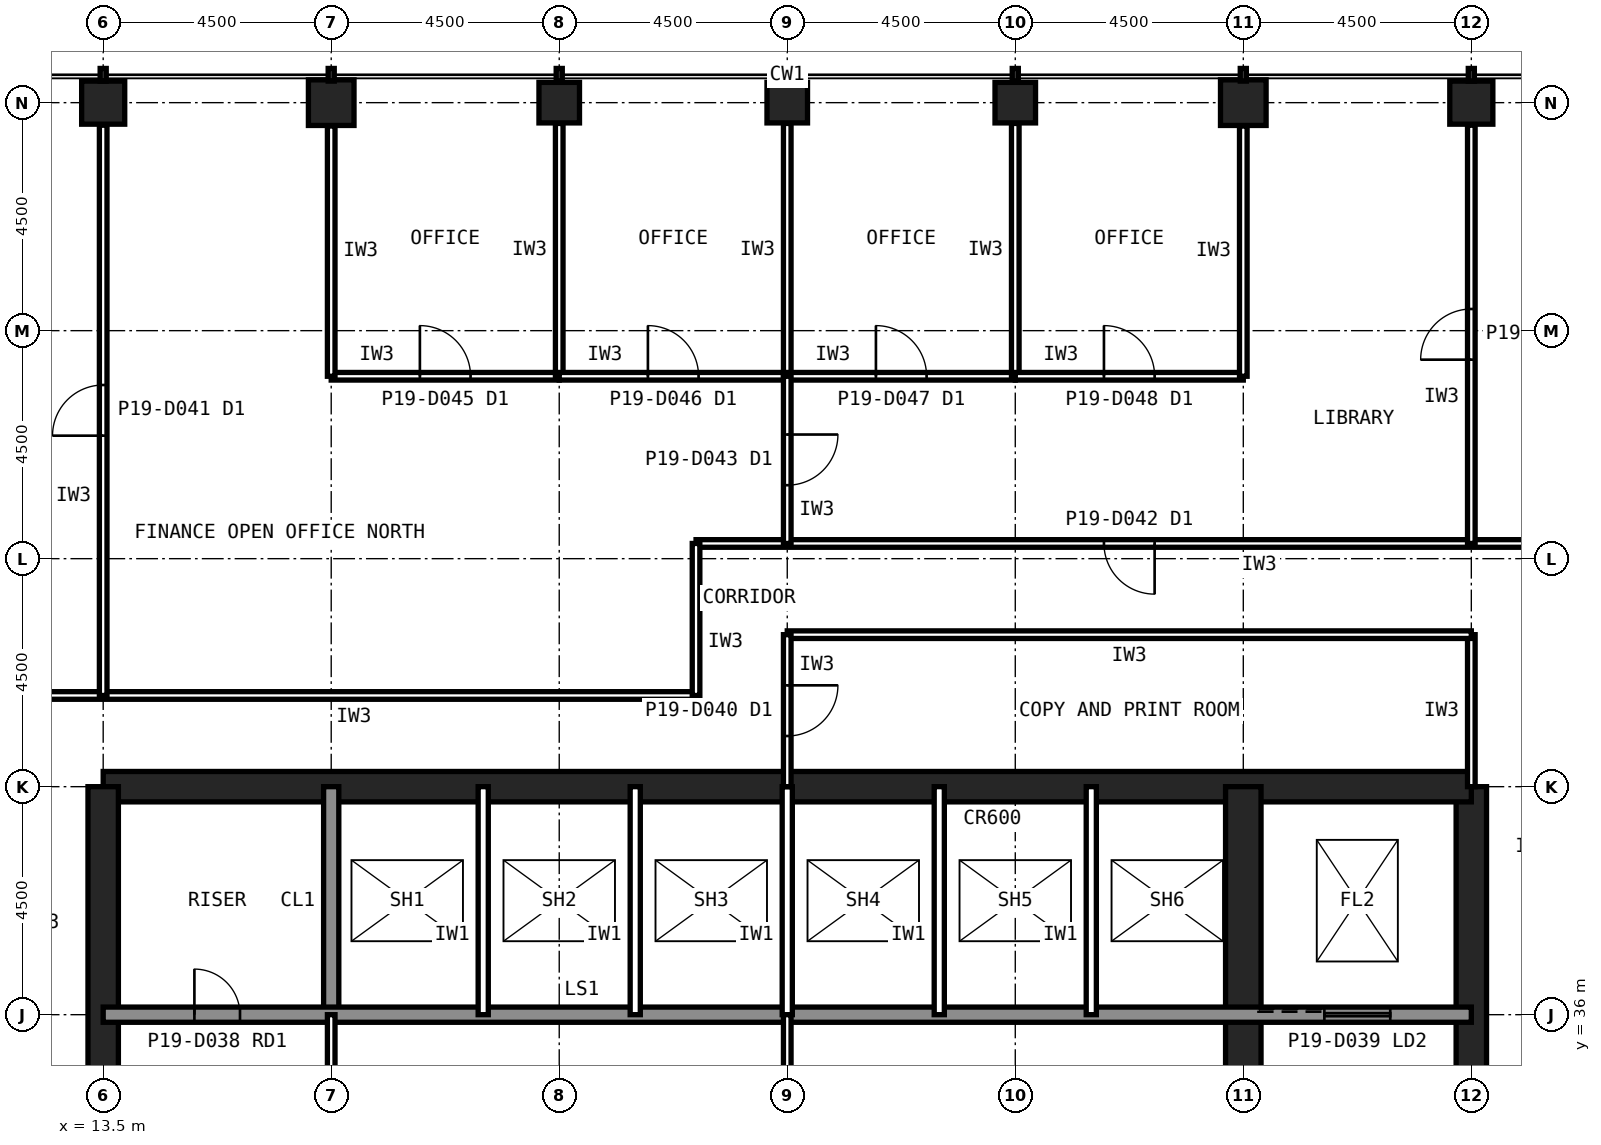
"""IFC4 building model, lengths in metres.
Left out: names, types, materials, properties, quantities, classifications, styles, units other than length and angle.
Written with IfcOpenShell. Run it as: python <this file> out.ifc"""

import sys

from ifc_helpers import new_model, si_unit, direction, frame, frame_2d, origin, origin_2d, place, context, subcontext, project, spatial, rectangle, hollow_rectangle, extrude, element, fill, save


model = new_model("IFC4")
c1 = context("Model", 3, precision=1e-05, world=origin(), true_north=direction((0.0, 1.0)))
c2 = subcontext(c1, "Body", "Model", "MODEL_VIEW")
j1 = project(units=[si_unit("LENGTHUNIT", "METRE"), si_unit("PLANEANGLEUNIT", "RADIAN")], contexts=[c1])
p1 = place(None, origin())
s1 = spatial("IfcSite", under=j1, at=p1, CompositionType="ELEMENT")
p2 = place(p1, origin())
s2 = spatial("IfcBuilding", under=s1, at=p2, CompositionType="ELEMENT")
p3 = place(p2, frame((0.0, 0.0, 79.4)))
s3 = spatial("IfcBuildingStorey", under=s2, at=p3, CompositionType="ELEMENT", Elevation=79.4)
p4 = place(p3, frame((40.5, 54.0, 0.0), z_axis=(0.0, 0.0, 1.0), x_axis=(1.0, 0.0, 0.0)))
e1 = element("IfcColumn", 1, at=p4, inside=s3, PredefinedType="COLUMN", context=c2, shape_type="SweptSolid", body=[
    extrude(hollow_rectangle(XDim=0.85, YDim=0.85, WallThickness=0.05, at=origin_2d()), origin(), (0.0, 0.0, 1.0), 4.2),
])
p5 = place(p3, frame((36.0, 54.0, 0.0), z_axis=(0.0, 0.0, 1.0), x_axis=(1.0, 0.0, 0.0)))
e2 = element("IfcColumn", 2, at=p5, inside=s3, PredefinedType="COLUMN", context=c2, shape_type="SweptSolid", body=[
    extrude(hollow_rectangle(XDim=0.9, YDim=0.9, WallThickness=0.063, at=origin_2d()), origin(), (0.0, 0.0, 1.0), 4.2),
])
for number, where, z_axis, x_axis in (
    (3, (31.5, 54.0, 0.0), (0.0, 0.0, 1.0), (1.0, 0.0, 0.0)),
    (4, (27.0, 54.0, 0.0), (0.0, 0.0, 1.0), (1.0, 0.0, 0.0)),
    (5, (22.5, 54.0, 0.0), (0.0, 0.0, 1.0), (1.0, 0.0, 0.0)),
):
    element("IfcColumn", number, at=place(p3, frame(where, z_axis=z_axis, x_axis=x_axis)), inside=s3, PredefinedType="COLUMN", context=c2, shape_type="SweptSolid", body=[
        extrude(hollow_rectangle(XDim=0.8, YDim=0.8, WallThickness=0.045, at=origin_2d()), origin(), (0.0, 0.0, 1.0), 4.2),
    ])
p6 = place(p3, frame((18.0, 54.0, 0.0), z_axis=(0.0, 0.0, 1.0), x_axis=(1.0, 0.0, 0.0)))
e6 = element("IfcColumn", 6, at=p6, inside=s3, PredefinedType="COLUMN", context=c2, shape_type="SweptSolid", body=[
    extrude(hollow_rectangle(XDim=0.9, YDim=0.9, WallThickness=0.063, at=origin_2d()), origin(), (0.0, 0.0, 1.0), 4.2),
])
p7 = place(p3, frame((13.5, 54.0, 0.0), z_axis=(0.0, 0.0, 1.0), x_axis=(1.0, 0.0, 0.0)))
e7 = element("IfcColumn", 7, at=p7, inside=s3, PredefinedType="COLUMN", context=c2, shape_type="SweptSolid", body=[
    extrude(hollow_rectangle(XDim=0.85, YDim=0.85, WallThickness=0.05, at=origin_2d()), origin(), (0.0, 0.0, 1.0), 4.2),
])
p8 = place(p3, frame((40.5, 13.5, 0.0), z_axis=(0.0, 0.0, 1.0), x_axis=(0.0, 1.0, 0.0)))
e8 = element("IfcWall", 8, at=p8, inside=s3, PredefinedType="SHEAR", context=c2, shape_type="SweptSolid", body=[
    extrude(rectangle(XDim=27.0, YDim=0.6, at=frame_2d((13.5, 0.0))), origin(), (0.0, 0.0, 1.0), 4.2),
])
p9 = place(p8, frame((5.85, 0.0, 0.0)))
e9 = element("IfcOpeningElement", 9, at=p9, cuts=e8, PredefinedType="OPENING", context=c2, shape_type="SweptSolid", body=[
    extrude(rectangle(XDim=1.8, YDim=2.1, at=frame_2d((0.9, 1.05))), frame((0.0, 0.31, 0.0), z_axis=(0.0, -1.0, 0.0), x_axis=(1.0, 0.0, 0.0)), (0.0, 0.0, 1.0), 0.62),
])
p10 = place(p8, frame((19.65, 0.0, 0.0)))
e10 = element("IfcOpeningElement", 10, at=p10, cuts=e8, PredefinedType="OPENING", context=c2, shape_type="SweptSolid", body=[
    extrude(rectangle(XDim=1.2, YDim=2.1, at=frame_2d((0.6, 1.05))), frame((0.0, 0.31, 0.0), z_axis=(0.0, -1.0, 0.0), x_axis=(1.0, 0.0, 0.0)), (0.0, 0.0, 1.0), 0.62),
])
p11 = place(p3, frame((40.5, 40.5, 0.0), z_axis=(0.0, 0.0, 1.0), x_axis=(-1.0, 0.0, 0.0)))
e11 = element("IfcWall", 11, at=p11, inside=s3, PredefinedType="SHEAR", context=c2, shape_type="SweptSolid", body=[
    extrude(rectangle(XDim=27.0, YDim=0.6, at=frame_2d((13.5, 0.0))), origin(), (0.0, 0.0, 1.0), 4.2),
])
p12 = place(p3, frame((13.5, 40.5, 0.0), z_axis=(0.0, 0.0, 1.0), x_axis=(0.0, -1.0, 0.0)))
e12 = element("IfcWall", 12, at=p12, inside=s3, PredefinedType="SHEAR", context=c2, shape_type="SweptSolid", body=[
    extrude(rectangle(XDim=27.0, YDim=0.6, at=frame_2d((13.5, 0.0))), origin(), (0.0, 0.0, 1.0), 4.2),
])
p13 = place(p12, frame((19.65, 0.0, 0.0)))
e13 = element("IfcOpeningElement", 13, at=p13, cuts=e12, PredefinedType="OPENING", context=c2, shape_type="SweptSolid", body=[
    extrude(rectangle(XDim=1.2, YDim=2.1, at=frame_2d((0.6, 1.05))), frame((0.0, 0.31, 0.0), z_axis=(0.0, -1.0, 0.0), x_axis=(1.0, 0.0, 0.0)), (0.0, 0.0, 1.0), 0.62),
])
p14 = place(p12, frame((5.85, 0.0, 0.0)))
e14 = element("IfcOpeningElement", 14, at=p14, cuts=e12, PredefinedType="OPENING", context=c2, shape_type="SweptSolid", body=[
    extrude(rectangle(XDim=1.8, YDim=2.1, at=frame_2d((0.9, 1.05))), frame((0.0, 0.31, 0.0), z_axis=(0.0, -1.0, 0.0), x_axis=(1.0, 0.0, 0.0)), (0.0, 0.0, 1.0), 0.62),
])
p15 = place(p3, frame((18.0, 36.0, 0.0), z_axis=(0.0, 0.0, 1.0), x_axis=(0.0, 1.0, 0.0)))
e15 = element("IfcWall", 15, at=p15, inside=s3, PredefinedType="SOLIDWALL", context=c2, shape_type="SweptSolid", body=[
    extrude(rectangle(XDim=4.5, YDim=0.3, at=frame_2d((2.25, 0.0))), origin(), (0.0, 0.0, 1.0), 4.04),
])
p16 = place(p3, frame((36.0, 22.5, 0.0), z_axis=(0.0, 0.0, 1.0), x_axis=(0.0, 1.0, 0.0)))
e16 = element("IfcWall", 16, at=p16, inside=s3, PredefinedType="SHEAR", context=c2, shape_type="SweptSolid", body=[
    extrude(rectangle(XDim=18.0, YDim=0.7, at=frame_2d((9.0, 0.0))), origin(), (0.0, 0.0, 1.0), 4.2),
])
p17 = place(p3, frame((13.5, 36.0, 0.0), z_axis=(0.0, 0.0, 1.0), x_axis=(1.0, 0.0, 0.0)))
e17 = element("IfcWall", 17, at=p17, inside=s3, PredefinedType="SOLIDWALL", context=c2, shape_type="SweptSolid", body=[
    extrude(rectangle(XDim=27.0, YDim=0.3, at=frame_2d((13.5, 0.0))), origin(), (0.0, 0.0, 1.0), 4.04),
])
p18 = place(p17, frame((1.8, 0.0, 0.0)))
e18 = element("IfcOpeningElement", 18, at=p18, cuts=e17, PredefinedType="OPENING", context=c2, shape_type="SweptSolid", body=[
    extrude(rectangle(XDim=0.9, YDim=2.1, at=frame_2d((0.45, 1.05))), frame((0.0, 0.16, 0.0), z_axis=(0.0, -1.0, 0.0), x_axis=(1.0, 0.0, 0.0)), (0.0, 0.0, 1.0), 0.32),
])
p19 = place(p17, frame((24.1, 0.0, 0.0)))
e19 = element("IfcOpeningElement", 19, at=p19, cuts=e17, PredefinedType="OPENING", context=c2, shape_type="SweptSolid", body=[
    extrude(rectangle(XDim=1.3, YDim=2.2, at=frame_2d((0.65, 1.1))), frame((0.0, 0.16, 0.0), z_axis=(0.0, -1.0, 0.0), x_axis=(1.0, 0.0, 0.0)), (0.0, 0.0, 1.0), 0.32),
])
for number, where, z_axis, x_axis in (
    (20, (21.0, 36.0, 0.0), (0.0, 0.0, 1.0), (0.0, 1.0, 0.0)),
    (21, (24.0, 36.0, 0.0), (0.0, 0.0, 1.0), (0.0, 1.0, 0.0)),
    (22, (27.0, 36.0, 0.0), (0.0, 0.0, 1.0), (0.0, 1.0, 0.0)),
    (23, (30.0, 36.0, 0.0), (0.0, 0.0, 1.0), (0.0, 1.0, 0.0)),
    (24, (33.0, 36.0, 0.0), (0.0, 0.0, 1.0), (0.0, 1.0, 0.0)),
):
    element("IfcWall", number, at=place(p3, frame(where, z_axis=z_axis, x_axis=x_axis)), inside=s3, PredefinedType="PARTITIONING", context=c2, shape_type="SweptSolid", body=[
        extrude(rectangle(XDim=4.5, YDim=0.2, at=frame_2d((2.25, 0.0))), origin(), (0.0, 0.0, 1.0), 4.04),
    ])
for number, where, z_axis, x_axis in (
    (25, (18.0, 33.3, 0.0), (0.0, 0.0, 1.0), (0.0, 1.0, 0.0)),
    (26, (30.0, 33.3, 0.0), (0.0, 0.0, 1.0), (0.0, 1.0, 0.0)),
):
    element("IfcWall", number, at=place(p3, frame(where, z_axis=z_axis, x_axis=x_axis)), inside=s3, PredefinedType="PARTITIONING", context=c2, shape_type="SweptSolid", body=[
        extrude(rectangle(XDim=2.7, YDim=0.15, at=frame_2d((1.35, 0.0))), origin(), (0.0, 0.0, 1.0), 4.04),
    ])
p20 = place(p3, frame((13.51, 40.5, 0.0), z_axis=(0.0, 0.0, 1.0), x_axis=(-1.0, 0.0, 0.0)))
e27 = element("IfcWall", 27, at=p20, inside=s3, PredefinedType="PARTITIONING", context=c2, shape_type="SweptSolid", body=[
    extrude(rectangle(XDim=1.81, YDim=0.15, at=frame_2d((0.905, 0.0))), origin(), (0.0, 0.0, 1.0), 3.189),
])
p21 = place(p3, frame((42.3, 40.5, 0.0), z_axis=(0.0, 0.0, 1.0), x_axis=(-1.0, 0.0, 0.0)))
e28 = element("IfcWall", 28, at=p21, inside=s3, PredefinedType="PARTITIONING", context=c2, shape_type="SweptSolid", body=[
    extrude(rectangle(XDim=1.8, YDim=0.15, at=frame_2d((0.9, 0.0))), origin(), (0.0, 0.0, 1.0), 3.189),
])
p22 = place(p3, frame((18.0, 48.6, 0.0), z_axis=(0.0, 0.0, 1.0), x_axis=(1.0, 0.0, 0.0)))
e29 = element("IfcWall", 29, at=p22, inside=s3, PredefinedType="PARTITIONING", context=c2, shape_type="SweptSolid", body=[
    extrude(rectangle(XDim=4.5, YDim=0.15, at=frame_2d((2.25, 0.0))), origin(), (0.0, 0.0, 1.0), 4.04),
])
p23 = place(p22, frame((1.75, 0.0, 0.0)))
e30 = element("IfcOpeningElement", 30, at=p23, cuts=e29, PredefinedType="OPENING", context=c2, shape_type="SweptSolid", body=[
    extrude(rectangle(XDim=1.0, YDim=2.1, at=frame_2d((0.5, 1.05))), frame((0.0, 0.085, 0.0), z_axis=(0.0, -1.0, 0.0), x_axis=(1.0, 0.0, 0.0)), (0.0, 0.0, 1.0), 0.17),
])
p24 = place(p3, frame((22.5, 48.6, 0.0), z_axis=(0.0, 0.0, 1.0), x_axis=(0.0, 1.0, 0.0)))
e31 = element("IfcWall", 31, at=p24, inside=s3, PredefinedType="PARTITIONING", context=c2, shape_type="SweptSolid", body=[
    extrude(rectangle(XDim=4.99, YDim=0.15, at=frame_2d((2.495, 0.0))), origin(), (0.0, 0.0, 1.0), 3.189),
])
p25 = place(p3, frame((18.0, 53.54, 0.0), z_axis=(0.0, 0.0, 1.0), x_axis=(0.0, -1.0, 0.0)))
e32 = element("IfcWall", 32, at=p25, inside=s3, PredefinedType="PARTITIONING", context=c2, shape_type="SweptSolid", body=[
    extrude(rectangle(XDim=4.94, YDim=0.15, at=frame_2d((2.47, 0.0))), origin(), (0.0, 0.0, 1.0), 3.189),
])
p26 = place(p3, frame((22.5, 48.6, 0.0), z_axis=(0.0, 0.0, 1.0), x_axis=(1.0, 0.0, 0.0)))
e33 = element("IfcWall", 33, at=p26, inside=s3, PredefinedType="PARTITIONING", context=c2, shape_type="SweptSolid", body=[
    extrude(rectangle(XDim=4.5, YDim=0.15, at=frame_2d((2.25, 0.0))), origin(), (0.0, 0.0, 1.0), 4.04),
])
p27 = place(p26, frame((1.75, 0.0, 0.0)))
e34 = element("IfcOpeningElement", 34, at=p27, cuts=e33, PredefinedType="OPENING", context=c2, shape_type="SweptSolid", body=[
    extrude(rectangle(XDim=1.0, YDim=2.1, at=frame_2d((0.5, 1.05))), frame((0.0, 0.085, 0.0), z_axis=(0.0, -1.0, 0.0), x_axis=(1.0, 0.0, 0.0)), (0.0, 0.0, 1.0), 0.17),
])
p28 = place(p3, frame((27.0, 48.6, 0.0), z_axis=(0.0, 0.0, 1.0), x_axis=(0.0, 1.0, 0.0)))
e35 = element("IfcWall", 35, at=p28, inside=s3, PredefinedType="PARTITIONING", context=c2, shape_type="SweptSolid", body=[
    extrude(rectangle(XDim=4.99, YDim=0.15, at=frame_2d((2.495, 0.0))), origin(), (0.0, 0.0, 1.0), 3.189),
])
p29 = place(p3, frame((27.0, 48.6, 0.0), z_axis=(0.0, 0.0, 1.0), x_axis=(1.0, 0.0, 0.0)))
e36 = element("IfcWall", 36, at=p29, inside=s3, PredefinedType="PARTITIONING", context=c2, shape_type="SweptSolid", body=[
    extrude(rectangle(XDim=4.5, YDim=0.15, at=frame_2d((2.25, 0.0))), origin(), (0.0, 0.0, 1.0), 4.04),
])
p30 = place(p29, frame((1.75, 0.0, 0.0)))
e37 = element("IfcOpeningElement", 37, at=p30, cuts=e36, PredefinedType="OPENING", context=c2, shape_type="SweptSolid", body=[
    extrude(rectangle(XDim=1.0, YDim=2.1, at=frame_2d((0.5, 1.05))), frame((0.0, 0.085, 0.0), z_axis=(0.0, -1.0, 0.0), x_axis=(1.0, 0.0, 0.0)), (0.0, 0.0, 1.0), 0.17),
])
p31 = place(p3, frame((31.5, 48.6, 0.0), z_axis=(0.0, 0.0, 1.0), x_axis=(0.0, 1.0, 0.0)))
e38 = element("IfcWall", 38, at=p31, inside=s3, PredefinedType="PARTITIONING", context=c2, shape_type="SweptSolid", body=[
    extrude(rectangle(XDim=4.99, YDim=0.15, at=frame_2d((2.495, 0.0))), origin(), (0.0, 0.0, 1.0), 3.189),
])
p32 = place(p3, frame((31.5, 48.6, 0.0), z_axis=(0.0, 0.0, 1.0), x_axis=(1.0, 0.0, 0.0)))
e39 = element("IfcWall", 39, at=p32, inside=s3, PredefinedType="PARTITIONING", context=c2, shape_type="SweptSolid", body=[
    extrude(rectangle(XDim=4.5, YDim=0.15, at=frame_2d((2.25, 0.0))), origin(), (0.0, 0.0, 1.0), 4.04),
])
p33 = place(p32, frame((1.75, 0.0, 0.0)))
e40 = element("IfcOpeningElement", 40, at=p33, cuts=e39, PredefinedType="OPENING", context=c2, shape_type="SweptSolid", body=[
    extrude(rectangle(XDim=1.0, YDim=2.1, at=frame_2d((0.5, 1.05))), frame((0.0, 0.085, 0.0), z_axis=(0.0, -1.0, 0.0), x_axis=(1.0, 0.0, 0.0)), (0.0, 0.0, 1.0), 0.17),
])
p34 = place(p3, frame((36.0, 48.6, 0.0), z_axis=(0.0, 0.0, 1.0), x_axis=(0.0, 1.0, 0.0)))
e41 = element("IfcWall", 41, at=p34, inside=s3, PredefinedType="PARTITIONING", context=c2, shape_type="SweptSolid", body=[
    extrude(rectangle(XDim=4.94, YDim=0.15, at=frame_2d((2.47, 0.0))), origin(), (0.0, 0.0, 1.0), 3.189),
])
p35 = place(p3, frame((40.5, 40.5, 0.0), z_axis=(0.0, 0.0, 1.0), x_axis=(0.0, 1.0, 0.0)))
e42 = element("IfcWall", 42, at=p35, inside=s3, PredefinedType="PARTITIONING", context=c2, shape_type="SweptSolid", body=[
    extrude(rectangle(XDim=3.0, YDim=0.15, at=frame_2d((1.5, 0.0))), origin(), (0.0, 0.0, 1.0), 3.189),
])
p36 = place(p3, frame((40.5, 43.5, 0.0), z_axis=(0.0, 0.0, 1.0), x_axis=(-1.0, 0.0, 0.0)))
e43 = element("IfcWall", 43, at=p36, inside=s3, PredefinedType="PARTITIONING", context=c2, shape_type="SweptSolid", body=[
    extrude(rectangle(XDim=13.5, YDim=0.15, at=frame_2d((6.75, 0.0))), origin(), (0.0, 0.0, 1.0), 4.04),
])
p37 = place(p3, frame((27.0, 43.5, 0.0), z_axis=(0.0, 0.0, 1.0), x_axis=(0.0, -1.0, 0.0)))
e44 = element("IfcWall", 44, at=p37, inside=s3, PredefinedType="PARTITIONING", context=c2, shape_type="SweptSolid", body=[
    extrude(rectangle(XDim=3.0, YDim=0.15, at=frame_2d((1.5, 0.0))), origin(), (0.0, 0.0, 1.0), 3.189),
])
p38 = place(p37, frame((1.0, 0.0, 0.0)))
e45 = element("IfcOpeningElement", 45, at=p38, cuts=e44, PredefinedType="OPENING", context=c2, shape_type="SweptSolid", body=[
    extrude(rectangle(XDim=1.0, YDim=2.1, at=frame_2d((0.5, 1.05))), frame((0.0, 0.085, 0.0), z_axis=(0.0, -1.0, 0.0), x_axis=(1.0, 0.0, 0.0)), (0.0, 0.0, 1.0), 0.17),
])
p39 = place(p3, frame((13.5, 40.5, 0.0), z_axis=(0.0, 0.0, 1.0), x_axis=(0.0, 1.0, 0.0)))
e46 = element("IfcWall", 46, at=p39, inside=s3, PredefinedType="PARTITIONING", context=c2, shape_type="SweptSolid", body=[
    extrude(rectangle(XDim=13.055, YDim=0.15, at=frame_2d((6.527, 0.0))), origin(), (0.0, 0.0, 1.0), 3.189),
])
p40 = place(p39, frame((6.028, 0.0, 0.0)))
e47 = element("IfcOpeningElement", 47, at=p40, cuts=e46, PredefinedType="OPENING", context=c2, shape_type="SweptSolid", body=[
    extrude(rectangle(XDim=1.0, YDim=2.1, at=frame_2d((0.5, 1.05))), frame((0.0, 0.085, 0.0), z_axis=(0.0, -1.0, 0.0), x_axis=(1.0, 0.0, 0.0)), (0.0, 0.0, 1.0), 0.17),
])
p41 = place(p3, frame((27.0, 48.6, 0.0), z_axis=(0.0, 0.0, 1.0), x_axis=(0.0, -1.0, 0.0)))
e48 = element("IfcWall", 48, at=p41, inside=s3, PredefinedType="PARTITIONING", context=c2, shape_type="SweptSolid", body=[
    extrude(rectangle(XDim=5.12, YDim=0.15, at=frame_2d((2.56, 0.0))), origin(), (0.0, 0.0, 1.0), 3.189),
])
p42 = place(p41, frame((2.06, 0.0, 0.0)))
e49 = element("IfcOpeningElement", 49, at=p42, cuts=e48, PredefinedType="OPENING", context=c2, shape_type="SweptSolid", body=[
    extrude(rectangle(XDim=1.0, YDim=2.1, at=frame_2d((0.5, 1.05))), frame((0.0, 0.085, 0.0), z_axis=(0.0, -1.0, 0.0), x_axis=(1.0, 0.0, 0.0)), (0.0, 0.0, 1.0), 0.17),
])
p43 = place(p3, frame((40.5, 43.48, 0.0), z_axis=(0.0, 0.0, 1.0), x_axis=(0.0, 1.0, 0.0)))
e50 = element("IfcWall", 50, at=p43, inside=s3, PredefinedType="PARTITIONING", context=c2, shape_type="SweptSolid", body=[
    extrude(rectangle(XDim=10.075, YDim=0.15, at=frame_2d((5.038, 0.0))), origin(), (0.0, 0.0, 1.0), 3.189),
])
p44 = place(p43, frame((4.538, 0.0, 0.0)))
e51 = element("IfcOpeningElement", 51, at=p44, cuts=e50, PredefinedType="OPENING", context=c2, shape_type="SweptSolid", body=[
    extrude(rectangle(XDim=1.0, YDim=2.1, at=frame_2d((0.5, 1.05))), frame((0.0, 0.085, 0.0), z_axis=(0.0, -1.0, 0.0), x_axis=(1.0, 0.0, 0.0)), (0.0, 0.0, 1.0), 0.17),
])
p45 = place(p18, origin())
e52 = element("IfcDoor", 52, at=p45, inside=s3, OperationType="SINGLE_SWING_LEFT", PredefinedType="DOOR", context=c2, shape_type="SweptSolid", body=[
    extrude(rectangle(XDim=0.9, YDim=2.1, at=frame_2d((0.45, 1.05))), frame((0.0, 0.025, 0.0), z_axis=(0.0, -1.0, 0.0), x_axis=(1.0, 0.0, 0.0)), (0.0, 0.0, 1.0), 0.05),
])
fill(e18, e52)
p46 = place(p19, origin())
e53 = element("IfcDoor", 53, at=p46, inside=s3, OperationType="SLIDING_TO_LEFT", PredefinedType="DOOR", context=c2, shape_type="SweptSolid", body=[
    extrude(rectangle(XDim=1.3, YDim=2.2, at=frame_2d((0.65, 1.1))), frame((0.0, 0.025, 0.0), z_axis=(0.0, -1.0, 0.0), x_axis=(1.0, 0.0, 0.0)), (0.0, 0.0, 1.0), 0.05),
])
fill(e19, e53)
p47 = place(p23, origin())
e54 = element("IfcDoor", 54, at=p47, inside=s3, OperationType="SINGLE_SWING_LEFT", PredefinedType="DOOR", context=c2, shape_type="SweptSolid", body=[
    extrude(rectangle(XDim=1.0, YDim=2.1, at=frame_2d((0.5, 1.05))), frame((0.0, 0.025, 0.0), z_axis=(0.0, -1.0, 0.0), x_axis=(1.0, 0.0, 0.0)), (0.0, 0.0, 1.0), 0.05),
])
fill(e30, e54)
p48 = place(p27, origin())
e55 = element("IfcDoor", 55, at=p48, inside=s3, OperationType="SINGLE_SWING_LEFT", PredefinedType="DOOR", context=c2, shape_type="SweptSolid", body=[
    extrude(rectangle(XDim=1.0, YDim=2.1, at=frame_2d((0.5, 1.05))), frame((0.0, 0.025, 0.0), z_axis=(0.0, -1.0, 0.0), x_axis=(1.0, 0.0, 0.0)), (0.0, 0.0, 1.0), 0.05),
])
fill(e34, e55)
p49 = place(p30, origin())
e56 = element("IfcDoor", 56, at=p49, inside=s3, OperationType="SINGLE_SWING_LEFT", PredefinedType="DOOR", context=c2, shape_type="SweptSolid", body=[
    extrude(rectangle(XDim=1.0, YDim=2.1, at=frame_2d((0.5, 1.05))), frame((0.0, 0.025, 0.0), z_axis=(0.0, -1.0, 0.0), x_axis=(1.0, 0.0, 0.0)), (0.0, 0.0, 1.0), 0.05),
])
fill(e37, e56)
p50 = place(p33, origin())
e57 = element("IfcDoor", 57, at=p50, inside=s3, OperationType="SINGLE_SWING_LEFT", PredefinedType="DOOR", context=c2, shape_type="SweptSolid", body=[
    extrude(rectangle(XDim=1.0, YDim=2.1, at=frame_2d((0.5, 1.05))), frame((0.0, 0.025, 0.0), z_axis=(0.0, -1.0, 0.0), x_axis=(1.0, 0.0, 0.0)), (0.0, 0.0, 1.0), 0.05),
])
fill(e40, e57)
p51 = place(p38, origin())
e58 = element("IfcDoor", 58, at=p51, inside=s3, OperationType="SINGLE_SWING_LEFT", PredefinedType="DOOR", context=c2, shape_type="SweptSolid", body=[
    extrude(rectangle(XDim=1.0, YDim=2.1, at=frame_2d((0.5, 1.05))), frame((0.0, 0.025, 0.0), z_axis=(0.0, -1.0, 0.0), x_axis=(1.0, 0.0, 0.0)), (0.0, 0.0, 1.0), 0.05),
])
fill(e45, e58)
p52 = place(p40, origin())
e59 = element("IfcDoor", 59, at=p52, inside=s3, OperationType="SINGLE_SWING_LEFT", PredefinedType="DOOR", context=c2, shape_type="SweptSolid", body=[
    extrude(rectangle(XDim=1.0, YDim=2.1, at=frame_2d((0.5, 1.05))), frame((0.0, 0.025, 0.0), z_axis=(0.0, -1.0, 0.0), x_axis=(1.0, 0.0, 0.0)), (0.0, 0.0, 1.0), 0.05),
])
fill(e47, e59)
p53 = place(p42, origin())
e60 = element("IfcDoor", 60, at=p53, inside=s3, OperationType="SINGLE_SWING_LEFT", PredefinedType="DOOR", context=c2, shape_type="SweptSolid", body=[
    extrude(rectangle(XDim=1.0, YDim=2.1, at=frame_2d((0.5, 1.05))), frame((0.0, 0.025, 0.0), z_axis=(0.0, -1.0, 0.0), x_axis=(1.0, 0.0, 0.0)), (0.0, 0.0, 1.0), 0.05),
])
fill(e49, e60)
p54 = place(p44, origin())
e61 = element("IfcDoor", 61, at=p54, inside=s3, OperationType="SINGLE_SWING_LEFT", PredefinedType="DOOR", context=c2, shape_type="SweptSolid", body=[
    extrude(rectangle(XDim=1.0, YDim=2.1, at=frame_2d((0.5, 1.05))), frame((0.0, 0.025, 0.0), z_axis=(0.0, -1.0, 0.0), x_axis=(1.0, 0.0, 0.0)), (0.0, 0.0, 1.0), 0.05),
])
fill(e51, e61)
save(model, sys.argv[1])
